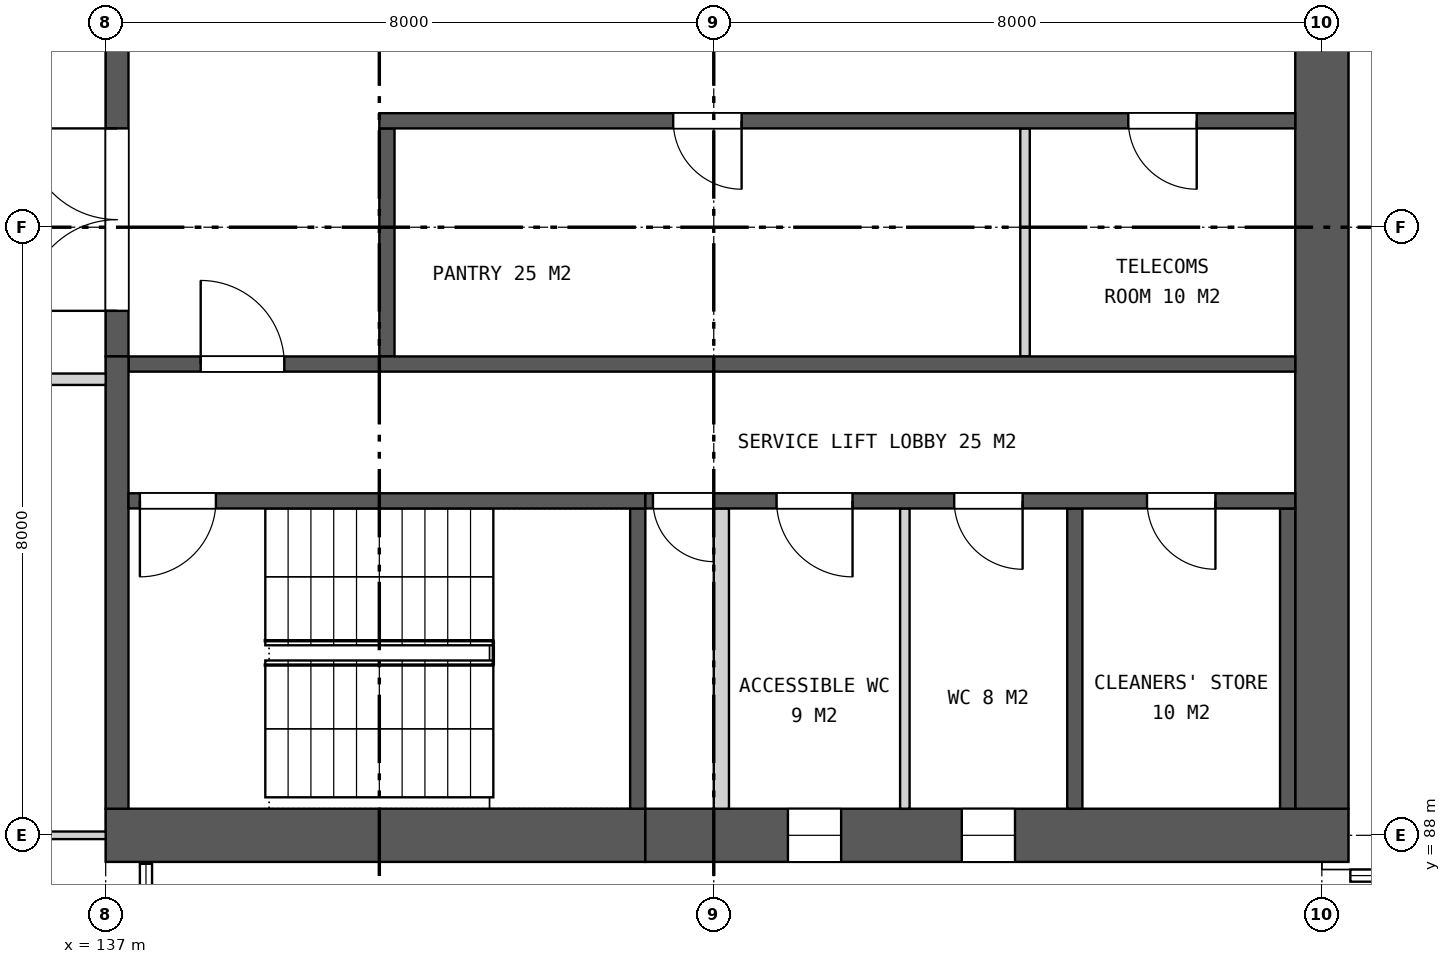
"""IFC4 building model, lengths in metres.
Left out: names, types, materials, properties, quantities, classifications, styles, units other than length and angle.
Written with IfcOpenShell. Run it as: python <this file> out.ifc"""

import sys

from ifc_helpers import new_model, si_unit, direction, frame, frame_2d, origin, place, context, subcontext, project, spatial, rectangle, extrude, element, fill, save


model = new_model("IFC4")
c1 = context("Model", 3, precision=1e-05, world=origin(), true_north=direction((0.0, 1.0)))
c2 = subcontext(c1, "Body", "Model", "MODEL_VIEW")
j1 = project(units=[si_unit("LENGTHUNIT", "METRE"), si_unit("PLANEANGLEUNIT", "RADIAN")], contexts=[c1])
p1 = place(None, origin())
s1 = spatial("IfcSite", under=j1, at=p1, CompositionType="ELEMENT")
p2 = place(p1, origin())
s2 = spatial("IfcBuilding", under=s1, at=p2, CompositionType="ELEMENT")
p3 = place(p2, frame((0.0, 0.0, 167.3)))
s3 = spatial("IfcBuildingStorey", under=s2, at=p3, CompositionType="ELEMENT", Elevation=167.3)
p4 = place(p3, frame((137.0, 88.0, 0.0), z_axis=(0.0, 0.0, 1.0), x_axis=(1.0, 0.0, 0.0)))
e1 = element("IfcWall", 1, at=p4, inside=s3, PredefinedType="SHEAR", context=c2, shape_type="SweptSolid", body=[
    extrude(rectangle(XDim=7.1, YDim=0.7, at=frame_2d((3.55, 0.0))), origin(), (0.0, 0.0, 1.0), 4.2),
])
p5 = place(p3, frame((144.1, 88.0, 0.0), z_axis=(0.0, 0.0, 1.0), x_axis=(1.0, 0.0, 0.0)))
e2 = element("IfcWall", 2, at=p5, inside=s3, PredefinedType="SHEAR", context=c2, shape_type="SweptSolid", body=[
    extrude(rectangle(XDim=9.25, YDim=0.7, at=frame_2d((4.625, 0.0))), origin(), (0.0, 0.0, 1.0), 4.2),
])
p6 = place(p5, frame((1.876, 0.0, 1.5)))
e3 = element("IfcOpeningElement", 3, at=p6, cuts=e2, PredefinedType="OPENING", context=c2, shape_type="SweptSolid", body=[
    extrude(rectangle(XDim=0.7, YDim=0.9, at=frame_2d((0.35, 0.45))), frame((0.0, 0.36, 0.0), z_axis=(0.0, -1.0, 0.0), x_axis=(1.0, 0.0, 0.0)), (0.0, 0.0, 1.0), 0.72),
])
p7 = place(p5, frame((4.163, 0.0, 1.5)))
e4 = element("IfcOpeningElement", 4, at=p7, cuts=e2, PredefinedType="OPENING", context=c2, shape_type="SweptSolid", body=[
    extrude(rectangle(XDim=0.7, YDim=0.9, at=frame_2d((0.35, 0.45))), frame((0.0, 0.36, 0.0), z_axis=(0.0, -1.0, 0.0), x_axis=(1.0, 0.0, 0.0)), (0.0, 0.0, 1.0), 0.72),
])
p8 = place(p3, frame((153.0, 88.35, 0.0), z_axis=(0.0, 0.0, 1.0), x_axis=(0.0, 1.0, 0.0)))
e5 = element("IfcWall", 5, at=p8, inside=s3, PredefinedType="SHEAR", context=c2, shape_type="SweptSolid", body=[
    extrude(rectangle(XDim=23.3, YDim=0.7, at=frame_2d((11.65, 0.0))), origin(), (0.0, 0.0, 1.0), 4.2),
])
p9 = place(p8, frame((10.45, 0.0, 0.0)))
e6 = element("IfcOpeningElement", 6, at=p9, cuts=e5, PredefinedType="OPENING", context=c2, shape_type="SweptSolid", body=[
    extrude(rectangle(XDim=2.4, YDim=2.4, at=frame_2d((1.2, 1.2))), frame((0.0, 0.36, 0.0), z_axis=(0.0, -1.0, 0.0), x_axis=(1.0, 0.0, 0.0)), (0.0, 0.0, 1.0), 0.72),
])
p10 = place(p3, frame((137.15, 94.3, 0.0), z_axis=(0.0, 0.0, 1.0), x_axis=(0.0, 1.0, 0.0)))
e7 = element("IfcWall", 7, at=p10, inside=s3, PredefinedType="SHEAR", context=c2, shape_type="SweptSolid", body=[
    extrude(rectangle(XDim=11.4, YDim=0.3, at=frame_2d((5.7, 0.0))), origin(), (0.0, 0.0, 1.0), 4.2),
])
p11 = place(p10, frame((0.6, 0.0, 0.0)))
e8 = element("IfcOpeningElement", 8, at=p11, cuts=e7, PredefinedType="OPENING", context=c2, shape_type="SweptSolid", body=[
    extrude(rectangle(XDim=2.4, YDim=2.4, at=frame_2d((1.2, 1.2))), frame((0.0, 0.16, 0.0), z_axis=(0.0, -1.0, 0.0), x_axis=(1.0, 0.0, 0.0)), (0.0, 0.0, 1.0), 0.32),
])
p12 = place(p10, frame((4.5, 0.0, 0.0)))
e9 = element("IfcOpeningElement", 9, at=p12, cuts=e7, PredefinedType="OPENING", context=c2, shape_type="SweptSolid", body=[
    extrude(rectangle(XDim=2.4, YDim=2.4, at=frame_2d((1.2, 1.2))), frame((0.0, 0.16, 0.0), z_axis=(0.0, -1.0, 0.0), x_axis=(1.0, 0.0, 0.0)), (0.0, 0.0, 1.0), 0.32),
])
p13 = place(p10, frame((8.4, 0.0, 0.0)))
e10 = element("IfcOpeningElement", 10, at=p13, cuts=e7, PredefinedType="OPENING", context=c2, shape_type="SweptSolid", body=[
    extrude(rectangle(XDim=2.4, YDim=2.4, at=frame_2d((1.2, 1.2))), frame((0.0, 0.16, 0.0), z_axis=(0.0, -1.0, 0.0), x_axis=(1.0, 0.0, 0.0)), (0.0, 0.0, 1.0), 0.32),
])
p14 = place(p3, frame((140.7, 94.3, 0.0), z_axis=(0.0, 0.0, 1.0), x_axis=(0.0, 1.0, 0.0)))
e11 = element("IfcWall", 11, at=p14, inside=s3, PredefinedType="SHEAR", context=c2, shape_type="SweptSolid", body=[
    extrude(rectangle(XDim=3.0, YDim=0.2, at=frame_2d((1.5, 0.0))), origin(), (0.0, 0.0, 1.0), 4.2),
])
p15 = place(p3, frame((149.095, 94.3, 0.0), z_axis=(0.0, 0.0, 1.0), x_axis=(0.0, 1.0, 0.0)))
e12 = element("IfcWall", 12, at=p15, inside=s3, PredefinedType="PARTITIONING", context=c2, shape_type="SweptSolid", body=[
    extrude(rectangle(XDim=3.0, YDim=0.125, at=frame_2d((1.5, 0.0))), origin(), (0.0, 0.0, 1.0), 4.2),
])
p16 = place(p3, frame((140.6, 97.4, 0.0), z_axis=(0.0, 0.0, 1.0), x_axis=(1.0, 0.0, 0.0)))
e13 = element("IfcWall", 13, at=p16, inside=s3, PredefinedType="SHEAR", context=c2, shape_type="SweptSolid", body=[
    extrude(rectangle(XDim=12.05, YDim=0.2, at=frame_2d((6.025, 0.0))), origin(), (0.0, 0.0, 1.0), 4.2),
])
p17 = place(p16, frame((3.866, 0.0, 0.0)))
e14 = element("IfcOpeningElement", 14, at=p17, cuts=e13, PredefinedType="OPENING", context=c2, shape_type="SweptSolid", body=[
    extrude(rectangle(XDim=0.9, YDim=2.1, at=frame_2d((0.45, 1.05))), frame((0.0, 0.11, 0.0), z_axis=(0.0, -1.0, 0.0), x_axis=(1.0, 0.0, 0.0)), (0.0, 0.0, 1.0), 0.22),
])
p18 = place(p16, frame((9.854, 0.0, 0.0)))
e15 = element("IfcOpeningElement", 15, at=p18, cuts=e13, PredefinedType="OPENING", context=c2, shape_type="SweptSolid", body=[
    extrude(rectangle(XDim=0.9, YDim=2.1, at=frame_2d((0.45, 1.05))), frame((0.0, 0.11, 0.0), z_axis=(0.0, -1.0, 0.0), x_axis=(1.0, 0.0, 0.0)), (0.0, 0.0, 1.0), 0.22),
])
p19 = place(p3, frame((137.3, 94.2, 0.0), z_axis=(0.0, 0.0, 1.0), x_axis=(1.0, 0.0, 0.0)))
e16 = element("IfcWall", 16, at=p19, inside=s3, PredefinedType="SHEAR", context=c2, shape_type="SweptSolid", body=[
    extrude(rectangle(XDim=15.35, YDim=0.2, at=frame_2d((7.675, 0.0))), origin(), (0.0, 0.0, 1.0), 4.2),
])
p20 = place(p19, frame((0.95, 0.0, 0.0)))
e17 = element("IfcOpeningElement", 17, at=p20, cuts=e16, PredefinedType="OPENING", context=c2, shape_type="SweptSolid", body=[
    extrude(rectangle(XDim=1.1, YDim=2.1, at=frame_2d((0.55, 1.05))), frame((0.0, 0.11, 0.0), z_axis=(0.0, -1.0, 0.0), x_axis=(1.0, 0.0, 0.0)), (0.0, 0.0, 1.0), 0.22),
])
p21 = place(p3, frame((137.15, 88.35, 0.0), z_axis=(0.0, 0.0, 1.0), x_axis=(0.0, 1.0, 0.0)))
e18 = element("IfcWall", 18, at=p21, inside=s3, PredefinedType="SHEAR", context=c2, shape_type="SweptSolid", body=[
    extrude(rectangle(XDim=5.95, YDim=0.3, at=frame_2d((2.975, 0.0))), origin(), (0.0, 0.0, 1.0), 4.2),
])
for number, where, z_axis, x_axis in (
    (19, (144.0, 88.35, 0.0), (0.0, 0.0, 1.0), (0.0, 1.0, 0.0)),
    (20, (149.75, 88.35, 0.0), (0.0, 0.0, 1.0), (0.0, 1.0, 0.0)),
    (21, (152.55, 88.35, 0.0), (0.0, 0.0, 1.0), (0.0, 1.0, 0.0)),
):
    element("IfcWall", number, at=place(p3, frame(where, z_axis=z_axis, x_axis=x_axis)), inside=s3, PredefinedType="SHEAR", context=c2, shape_type="SweptSolid", body=[
        extrude(rectangle(XDim=3.95, YDim=0.2, at=frame_2d((1.975, 0.0))), origin(), (0.0, 0.0, 1.0), 4.2),
    ])
p22 = place(p3, frame((145.1, 88.35, 0.0), z_axis=(0.0, 0.0, 1.0), x_axis=(0.0, 1.0, 0.0)))
e22 = element("IfcWall", 22, at=p22, inside=s3, PredefinedType="PARTITIONING", context=c2, shape_type="SweptSolid", body=[
    extrude(rectangle(XDim=3.95, YDim=0.2, at=frame_2d((1.975, 0.0))), origin(), (0.0, 0.0, 1.0), 4.2),
])
p23 = place(p3, frame((147.514, 88.35, 0.0), z_axis=(0.0, 0.0, 1.0), x_axis=(0.0, 1.0, 0.0)))
e23 = element("IfcWall", 23, at=p23, inside=s3, PredefinedType="PARTITIONING", context=c2, shape_type="SweptSolid", body=[
    extrude(rectangle(XDim=3.95, YDim=0.125, at=frame_2d((1.975, 0.0))), origin(), (0.0, 0.0, 1.0), 4.2),
])
p24 = place(p3, frame((137.3, 92.4, 0.0), z_axis=(0.0, 0.0, 1.0), x_axis=(1.0, 0.0, 0.0)))
e24 = element("IfcWall", 24, at=p24, inside=s3, PredefinedType="SHEAR", context=c2, shape_type="SweptSolid", body=[
    extrude(rectangle(XDim=6.8, YDim=0.2, at=frame_2d((3.4, 0.0))), origin(), (0.0, 0.0, 1.0), 4.2),
])
p25 = place(p24, frame((0.15, 0.0, 0.0)))
e25 = element("IfcOpeningElement", 25, at=p25, cuts=e24, PredefinedType="OPENING", context=c2, shape_type="SweptSolid", body=[
    extrude(rectangle(XDim=1.0, YDim=2.1, at=frame_2d((0.5, 1.05))), frame((0.0, 0.11, 0.0), z_axis=(0.0, -1.0, 0.0), x_axis=(1.0, 0.0, 0.0)), (0.0, 0.0, 1.0), 0.22),
])
p26 = place(p3, frame((144.1, 92.4, 0.0), z_axis=(0.0, 0.0, 1.0), x_axis=(1.0, 0.0, 0.0)))
e26 = element("IfcWall", 26, at=p26, inside=s3, PredefinedType="SHEAR", context=c2, shape_type="SweptSolid", body=[
    extrude(rectangle(XDim=8.55, YDim=0.2, at=frame_2d((4.275, 0.0))), origin(), (0.0, 0.0, 1.0), 4.2),
])
p27 = place(p26, frame((0.1, 0.0, 0.0)))
e27 = element("IfcOpeningElement", 27, at=p27, cuts=e26, PredefinedType="OPENING", context=c2, shape_type="SweptSolid", body=[
    extrude(rectangle(XDim=0.8, YDim=2.1, at=frame_2d((0.4, 1.05))), frame((0.0, 0.11, 0.0), z_axis=(0.0, -1.0, 0.0), x_axis=(1.0, 0.0, 0.0)), (0.0, 0.0, 1.0), 0.22),
])
p28 = place(p26, frame((1.726, 0.0, 0.0)))
e28 = element("IfcOpeningElement", 28, at=p28, cuts=e26, PredefinedType="OPENING", context=c2, shape_type="SweptSolid", body=[
    extrude(rectangle(XDim=1.0, YDim=2.1, at=frame_2d((0.5, 1.05))), frame((0.0, 0.11, 0.0), z_axis=(0.0, -1.0, 0.0), x_axis=(1.0, 0.0, 0.0)), (0.0, 0.0, 1.0), 0.22),
])
p29 = place(p26, frame((4.063, 0.0, 0.0)))
e29 = element("IfcOpeningElement", 29, at=p29, cuts=e26, PredefinedType="OPENING", context=c2, shape_type="SweptSolid", body=[
    extrude(rectangle(XDim=0.9, YDim=2.1, at=frame_2d((0.45, 1.05))), frame((0.0, 0.11, 0.0), z_axis=(0.0, -1.0, 0.0), x_axis=(1.0, 0.0, 0.0)), (0.0, 0.0, 1.0), 0.22),
])
p30 = place(p26, frame((6.6, 0.0, 0.0)))
e30 = element("IfcOpeningElement", 30, at=p30, cuts=e26, PredefinedType="OPENING", context=c2, shape_type="SweptSolid", body=[
    extrude(rectangle(XDim=0.9, YDim=2.1, at=frame_2d((0.45, 1.05))), frame((0.0, 0.11, 0.0), z_axis=(0.0, -1.0, 0.0), x_axis=(1.0, 0.0, 0.0)), (0.0, 0.0, 1.0), 0.22),
])
p31 = place(p3, frame((126.275, 88.0, 0.0), z_axis=(0.0, 0.0, 1.0), x_axis=(1.0, 0.0, 0.0)))
e31 = element("IfcWall", 31, at=p31, inside=s3, PredefinedType="PARTITIONING", context=c2, shape_type="SweptSolid", body=[
    extrude(rectangle(XDim=10.725, YDim=0.1, at=frame_2d((5.363, 0.0))), origin(), (0.0, 0.0, 1.0), 3.26),
])
p32 = place(p3, frame((131.475, 94.0, 0.0), z_axis=(0.0, 0.0, 1.0), x_axis=(1.0, 0.0, 0.0)))
e32 = element("IfcWall", 32, at=p32, inside=s3, PredefinedType="PARTITIONING", context=c2, shape_type="SweptSolid", body=[
    extrude(rectangle(XDim=5.525, YDim=0.15, at=frame_2d((2.762, 0.0))), origin(), (0.0, 0.0, 1.0), 3.26),
])
p33 = place(p6, origin())
e33 = element("IfcWindow", 33, at=p33, inside=s3, PartitioningType="SINGLE_PANEL", PredefinedType="WINDOW", context=c2, shape_type="SweptSolid", body=[
    extrude(rectangle(XDim=0.7, YDim=0.9, at=frame_2d((0.35, 0.45))), frame((0.0, 0.03, 0.0), z_axis=(0.0, -1.0, 0.0), x_axis=(1.0, 0.0, 0.0)), (0.0, 0.0, 1.0), 0.06),
])
fill(e3, e33)
p34 = place(p7, origin())
e34 = element("IfcWindow", 34, at=p34, inside=s3, PartitioningType="SINGLE_PANEL", PredefinedType="WINDOW", context=c2, shape_type="SweptSolid", body=[
    extrude(rectangle(XDim=0.7, YDim=0.9, at=frame_2d((0.35, 0.45))), frame((0.0, 0.03, 0.0), z_axis=(0.0, -1.0, 0.0), x_axis=(1.0, 0.0, 0.0)), (0.0, 0.0, 1.0), 0.06),
])
fill(e4, e34)
p35 = place(p11, origin())
e35 = element("IfcDoor", 35, at=p35, inside=s3, OperationType="DOUBLE_DOOR_SINGLE_SWING", PredefinedType="DOOR", context=c2, shape_type="SweptSolid", body=[
    extrude(rectangle(XDim=2.4, YDim=2.4, at=frame_2d((1.2, 1.2))), frame((0.0, 0.025, 0.0), z_axis=(0.0, -1.0, 0.0), x_axis=(1.0, 0.0, 0.0)), (0.0, 0.0, 1.0), 0.05),
])
fill(e8, e35)
p36 = place(p17, frame((0.9, 0.0, 0.0), z_axis=(0.0, 0.0, 1.0), x_axis=(-1.0, 0.0, 0.0)))
e36 = element("IfcDoor", 36, at=p36, inside=s3, OperationType="SINGLE_SWING_LEFT", PredefinedType="DOOR", context=c2, shape_type="SweptSolid", body=[
    extrude(rectangle(XDim=0.9, YDim=2.1, at=frame_2d((0.45, 1.05))), frame((0.0, 0.025, 0.0), z_axis=(0.0, -1.0, 0.0), x_axis=(1.0, 0.0, 0.0)), (0.0, 0.0, 1.0), 0.05),
])
fill(e14, e36)
p37 = place(p18, frame((0.9, 0.0, 0.0), z_axis=(0.0, 0.0, 1.0), x_axis=(-1.0, 0.0, 0.0)))
e37 = element("IfcDoor", 37, at=p37, inside=s3, OperationType="SINGLE_SWING_LEFT", PredefinedType="DOOR", context=c2, shape_type="SweptSolid", body=[
    extrude(rectangle(XDim=0.9, YDim=2.1, at=frame_2d((0.45, 1.05))), frame((0.0, 0.025, 0.0), z_axis=(0.0, -1.0, 0.0), x_axis=(1.0, 0.0, 0.0)), (0.0, 0.0, 1.0), 0.05),
])
fill(e15, e37)
p38 = place(p20, origin())
e38 = element("IfcDoor", 38, at=p38, inside=s3, OperationType="SINGLE_SWING_LEFT", PredefinedType="DOOR", context=c2, shape_type="SweptSolid", body=[
    extrude(rectangle(XDim=1.1, YDim=2.1, at=frame_2d((0.55, 1.05))), frame((0.0, 0.025, 0.0), z_axis=(0.0, -1.0, 0.0), x_axis=(1.0, 0.0, 0.0)), (0.0, 0.0, 1.0), 0.05),
])
fill(e17, e38)
p39 = place(p25, frame((1.0, 0.0, 0.0), z_axis=(0.0, 0.0, 1.0), x_axis=(-1.0, 0.0, 0.0)))
e39 = element("IfcDoor", 39, at=p39, inside=s3, OperationType="SINGLE_SWING_RIGHT", PredefinedType="DOOR", context=c2, shape_type="SweptSolid", body=[
    extrude(rectangle(XDim=1.0, YDim=2.1, at=frame_2d((0.5, 1.05))), frame((0.0, 0.025, 0.0), z_axis=(0.0, -1.0, 0.0), x_axis=(1.0, 0.0, 0.0)), (0.0, 0.0, 1.0), 0.05),
])
fill(e25, e39)
p40 = place(p27, frame((0.8, 0.0, 0.0), z_axis=(0.0, 0.0, 1.0), x_axis=(-1.0, 0.0, 0.0)))
e40 = element("IfcDoor", 40, at=p40, inside=s3, OperationType="SINGLE_SWING_LEFT", PredefinedType="DOOR", context=c2, shape_type="SweptSolid", body=[
    extrude(rectangle(XDim=0.8, YDim=2.1, at=frame_2d((0.4, 1.05))), frame((0.0, 0.025, 0.0), z_axis=(0.0, -1.0, 0.0), x_axis=(1.0, 0.0, 0.0)), (0.0, 0.0, 1.0), 0.05),
])
fill(e27, e40)
p41 = place(p28, frame((1.0, 0.0, 0.0), z_axis=(0.0, 0.0, 1.0), x_axis=(-1.0, 0.0, 0.0)))
e41 = element("IfcDoor", 41, at=p41, inside=s3, OperationType="SINGLE_SWING_LEFT", PredefinedType="DOOR", context=c2, shape_type="SweptSolid", body=[
    extrude(rectangle(XDim=1.0, YDim=2.1, at=frame_2d((0.5, 1.05))), frame((0.0, 0.025, 0.0), z_axis=(0.0, -1.0, 0.0), x_axis=(1.0, 0.0, 0.0)), (0.0, 0.0, 1.0), 0.05),
])
fill(e28, e41)
p42 = place(p29, frame((0.9, 0.0, 0.0), z_axis=(0.0, 0.0, 1.0), x_axis=(-1.0, 0.0, 0.0)))
e42 = element("IfcDoor", 42, at=p42, inside=s3, OperationType="SINGLE_SWING_LEFT", PredefinedType="DOOR", context=c2, shape_type="SweptSolid", body=[
    extrude(rectangle(XDim=0.9, YDim=2.1, at=frame_2d((0.45, 1.05))), frame((0.0, 0.025, 0.0), z_axis=(0.0, -1.0, 0.0), x_axis=(1.0, 0.0, 0.0)), (0.0, 0.0, 1.0), 0.05),
])
fill(e29, e42)
p43 = place(p30, frame((0.9, 0.0, 0.0), z_axis=(0.0, 0.0, 1.0), x_axis=(-1.0, 0.0, 0.0)))
e43 = element("IfcDoor", 43, at=p43, inside=s3, OperationType="SINGLE_SWING_LEFT", PredefinedType="DOOR", context=c2, shape_type="SweptSolid", body=[
    extrude(rectangle(XDim=0.9, YDim=2.1, at=frame_2d((0.45, 1.05))), frame((0.0, 0.025, 0.0), z_axis=(0.0, -1.0, 0.0), x_axis=(1.0, 0.0, 0.0)), (0.0, 0.0, 1.0), 0.05),
])
fill(e30, e43)
save(model, sys.argv[1])
